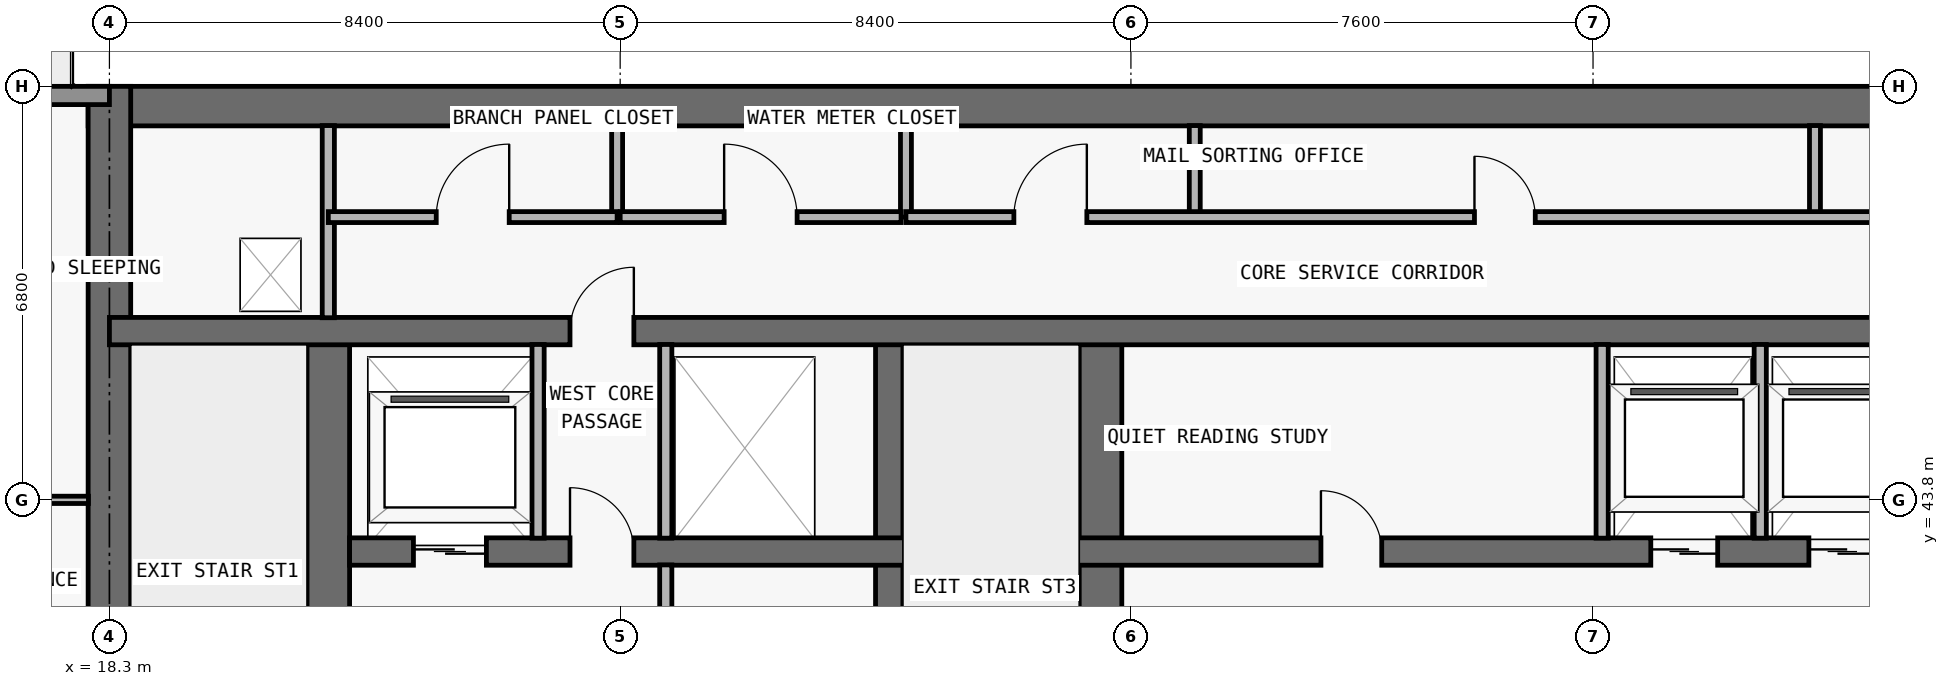
"""IFC4 building model, lengths in metres.
Left out: names, types, materials, properties, quantities, classifications, styles, units other than length and angle.
Written with IfcOpenShell. Run it as: python <this file> out.ifc"""

import sys

from ifc_helpers import new_model, si_unit, direction, frame, frame_2d, origin, place, context, subcontext, project, spatial, rectangle, extrude, element, fill, save


model = new_model("IFC4")
c1 = context("Model", 3, precision=1e-05, world=origin(), true_north=direction((0.0, 1.0)))
c2 = subcontext(c1, "Body", "Model", "MODEL_VIEW")
j1 = project(units=[si_unit("LENGTHUNIT", "METRE"), si_unit("PLANEANGLEUNIT", "RADIAN")], contexts=[c1])
p1 = place(None, origin())
s1 = spatial("IfcSite", under=j1, at=p1, CompositionType="ELEMENT")
p2 = place(p1, origin())
s2 = spatial("IfcBuilding", under=s1, at=p2, CompositionType="ELEMENT")
p3 = place(p2, frame((0.0, 0.0, 170.4)))
s3 = spatial("IfcBuildingStorey", under=s2, at=p3, CompositionType="ELEMENT", Elevation=170.4)
p4 = place(p3, frame((17.95, 50.275, 0.0), z_axis=(0.0, 0.0, 1.0), x_axis=(1.0, 0.0, 0.0)))
e1 = element("IfcWall", 1, at=p4, inside=s3, PredefinedType="SHEAR", context=c2, shape_type="SweptSolid", body=[
    extrude(rectangle(XDim=41.9, YDim=0.65, at=frame_2d((20.95, 0.0))), origin(), (0.0, 0.0, 1.0), 3.05),
])
p5 = place(p3, frame((18.3, 36.65, 0.0), z_axis=(0.0, 0.0, 1.0), x_axis=(0.0, 1.0, 0.0)))
e2 = element("IfcWall", 2, at=p5, inside=s3, PredefinedType="SHEAR", context=c2, shape_type="SweptSolid", body=[
    extrude(rectangle(XDim=13.95, YDim=0.7, at=frame_2d((6.975, 0.0))), origin(), (0.0, 0.0, 1.0), 3.05),
])
p6 = place(p3, frame((21.9, 37.0, 0.0), z_axis=(0.0, 0.0, 1.0), x_axis=(0.0, 1.0, 0.0)))
e3 = element("IfcWall", 3, at=p6, inside=s3, PredefinedType="SHEAR", context=c2, shape_type="SweptSolid", body=[
    extrude(rectangle(XDim=9.575, YDim=0.7, at=frame_2d((4.788, 0.0))), origin(), (0.0, 0.0, 1.0), 3.05),
])
p7 = place(p6, frame((0.55, 0.0, 0.0)))
e4 = element("IfcOpeningElement", 4, at=p7, cuts=e3, PredefinedType="OPENING", context=c2, shape_type="SweptSolid", body=[
    extrude(rectangle(XDim=1.1, YDim=2.15, at=frame_2d((0.55, 1.075))), frame((0.0, 0.36, 0.0), z_axis=(0.0, -1.0, 0.0), x_axis=(1.0, 0.0, 0.0)), (0.0, 0.0, 1.0), 0.72),
])
p8 = place(p3, frame((31.125, 37.0, 0.0), z_axis=(0.0, 0.0, 1.0), x_axis=(0.0, 1.0, 0.0)))
e5 = element("IfcWall", 5, at=p8, inside=s3, PredefinedType="SHEAR", context=c2, shape_type="SweptSolid", body=[
    extrude(rectangle(XDim=9.575, YDim=0.45, at=frame_2d((4.788, 0.0))), origin(), (0.0, 0.0, 1.0), 3.05),
])
p9 = place(p3, frame((34.6, 37.0, 0.0), z_axis=(0.0, 0.0, 1.0), x_axis=(0.0, 1.0, 0.0)))
e6 = element("IfcWall", 6, at=p9, inside=s3, PredefinedType="SHEAR", context=c2, shape_type="SweptSolid", body=[
    extrude(rectangle(XDim=9.575, YDim=0.7, at=frame_2d((4.788, 0.0))), origin(), (0.0, 0.0, 1.0), 3.05),
])
p10 = place(p3, frame((22.25, 42.95, 0.0), z_axis=(0.0, 0.0, 1.0), x_axis=(1.0, 0.0, 0.0)))
e7 = element("IfcWall", 7, at=p10, inside=s3, PredefinedType="SHEAR", context=c2, shape_type="SweptSolid", body=[
    extrude(rectangle(XDim=33.3, YDim=0.45, at=frame_2d((16.65, 0.0))), origin(), (0.0, 0.0, 1.0), 3.05),
])
p11 = place(p10, frame((1.05, 0.0, 0.0)))
e8 = element("IfcOpeningElement", 8, at=p11, cuts=e7, PredefinedType="OPENING", context=c2, shape_type="SweptSolid", body=[
    extrude(rectangle(XDim=1.2, YDim=2.2, at=frame_2d((0.6, 1.1))), frame((0.0, 0.235, 0.0), z_axis=(0.0, -1.0, 0.0), x_axis=(1.0, 0.0, 0.0)), (0.0, 0.0, 1.0), 0.47),
])
p12 = place(p10, frame((31.05, 0.0, 0.0)))
e9 = element("IfcOpeningElement", 9, at=p12, cuts=e7, PredefinedType="OPENING", context=c2, shape_type="SweptSolid", body=[
    extrude(rectangle(XDim=1.2, YDim=2.2, at=frame_2d((0.6, 1.1))), frame((0.0, 0.235, 0.0), z_axis=(0.0, -1.0, 0.0), x_axis=(1.0, 0.0, 0.0)), (0.0, 0.0, 1.0), 0.47),
])
p13 = place(p10, frame((21.4, 0.0, 0.0)))
e10 = element("IfcOpeningElement", 10, at=p13, cuts=e7, PredefinedType="OPENING", context=c2, shape_type="SweptSolid", body=[
    extrude(rectangle(XDim=1.1, YDim=2.2, at=frame_2d((0.55, 1.1))), frame((0.0, 0.235, 0.0), z_axis=(0.0, -1.0, 0.0), x_axis=(1.0, 0.0, 0.0)), (0.0, 0.0, 1.0), 0.47),
])
p14 = place(p10, frame((24.0, 0.0, 0.0)))
e11 = element("IfcOpeningElement", 11, at=p14, cuts=e7, PredefinedType="OPENING", context=c2, shape_type="SweptSolid", body=[
    extrude(rectangle(XDim=1.1, YDim=2.2, at=frame_2d((0.55, 1.1))), frame((0.0, 0.235, 0.0), z_axis=(0.0, -1.0, 0.0), x_axis=(1.0, 0.0, 0.0)), (0.0, 0.0, 1.0), 0.47),
])
p15 = place(p10, frame((3.625, 0.0, 0.0)))
e12 = element("IfcOpeningElement", 12, at=p15, cuts=e7, PredefinedType="OPENING", context=c2, shape_type="SweptSolid", body=[
    extrude(rectangle(XDim=1.05, YDim=2.15, at=frame_2d((0.525, 1.075))), frame((0.0, 0.235, 0.0), z_axis=(0.0, -1.0, 0.0), x_axis=(1.0, 0.0, 0.0)), (0.0, 0.0, 1.0), 0.47),
])
p16 = place(p10, frame((28.675, 0.0, 0.0)))
e13 = element("IfcOpeningElement", 13, at=p16, cuts=e7, PredefinedType="OPENING", context=c2, shape_type="SweptSolid", body=[
    extrude(rectangle(XDim=1.05, YDim=2.15, at=frame_2d((0.525, 1.075))), frame((0.0, 0.235, 0.0), z_axis=(0.0, -1.0, 0.0), x_axis=(1.0, 0.0, 0.0)), (0.0, 0.0, 1.0), 0.47),
])
p17 = place(p10, frame((15.975, 0.0, 0.0)))
e14 = element("IfcOpeningElement", 14, at=p17, cuts=e7, PredefinedType="OPENING", context=c2, shape_type="SweptSolid", body=[
    extrude(rectangle(XDim=1.0, YDim=2.2, at=frame_2d((0.5, 1.1))), frame((0.0, 0.235, 0.0), z_axis=(0.0, -1.0, 0.0), x_axis=(1.0, 0.0, 0.0)), (0.0, 0.0, 1.0), 0.47),
])
p18 = place(p3, frame((18.3, 46.575, 0.0), z_axis=(0.0, 0.0, 1.0), x_axis=(1.0, 0.0, 0.0)))
e15 = element("IfcWall", 15, at=p18, inside=s3, PredefinedType="SHEAR", context=c2, shape_type="SweptSolid", body=[
    extrude(rectangle(XDim=41.2, YDim=0.45, at=frame_2d((20.6, 0.0))), origin(), (0.0, 0.0, 1.0), 3.05),
])
p19 = place(p18, frame((7.575, 0.0, 0.0)))
e16 = element("IfcOpeningElement", 16, at=p19, cuts=e15, PredefinedType="OPENING", context=c2, shape_type="SweptSolid", body=[
    extrude(rectangle(XDim=1.05, YDim=2.15, at=frame_2d((0.525, 1.075))), frame((0.0, 0.235, 0.0), z_axis=(0.0, -1.0, 0.0), x_axis=(1.0, 0.0, 0.0)), (0.0, 0.0, 1.0), 0.47),
])
p20 = place(p18, frame((32.625, 0.0, 0.0)))
e17 = element("IfcOpeningElement", 17, at=p20, cuts=e15, PredefinedType="OPENING", context=c2, shape_type="SweptSolid", body=[
    extrude(rectangle(XDim=1.05, YDim=2.15, at=frame_2d((0.525, 1.075))), frame((0.0, 0.235, 0.0), z_axis=(0.0, -1.0, 0.0), x_axis=(1.0, 0.0, 0.0)), (0.0, 0.0, 1.0), 0.47),
])
p21 = place(p3, frame((10.1, 50.45, 0.0), z_axis=(0.0, 0.0, 1.0), x_axis=(1.0, 0.0, 0.0)))
e18 = element("IfcWall", 18, at=p21, inside=s3, PredefinedType="STANDARD", context=c2, shape_type="SweptSolid", body=[
    extrude(rectangle(XDim=8.2, YDim=0.3, at=frame_2d((4.1, 0.0))), origin(), (0.0, 0.0, 1.0), 3.05),
])
p22 = place(p21, frame((3.1, 0.0, 0.0)))
e19 = element("IfcOpeningElement", 19, at=p22, cuts=e18, PredefinedType="OPENING", context=c2, shape_type="SweptSolid", body=[
    extrude(rectangle(XDim=2.0, YDim=2.3, at=frame_2d((1.0, 1.15))), frame((0.0, 0.16, 0.0), z_axis=(0.0, -1.0, 0.0), x_axis=(1.0, 0.0, 0.0)), (0.0, 0.0, 1.0), 0.32),
])
p23 = place(p3, frame((21.9, 46.795, 0.0), z_axis=(0.0, 0.0, 1.0), x_axis=(0.0, 1.0, 0.0)))
e20 = element("IfcWall", 20, at=p23, inside=s3, PredefinedType="PARTITIONING", context=c2, shape_type="SweptSolid", body=[
    extrude(rectangle(XDim=3.16, YDim=0.2, at=frame_2d((1.58, 0.0))), origin(), (0.0, 0.0, 1.0), 3.05),
])
p24 = place(p3, frame((25.35, 43.17, 0.0), z_axis=(0.0, 0.0, 1.0), x_axis=(0.0, 1.0, 0.0)))
e21 = element("IfcWall", 21, at=p24, inside=s3, PredefinedType="PARTITIONING", context=c2, shape_type="SweptSolid", body=[
    extrude(rectangle(XDim=3.185, YDim=0.2, at=frame_2d((1.593, 0.0))), origin(), (0.0, 0.0, 1.0), 3.05),
])
p25 = place(p3, frame((26.65, 48.45, 0.0), z_axis=(0.0, 0.0, 1.0), x_axis=(0.0, 1.0, 0.0)))
e22 = element("IfcWall", 22, at=p25, inside=s3, PredefinedType="PARTITIONING", context=c2, shape_type="SweptSolid", body=[
    extrude(rectangle(XDim=1.505, YDim=0.18, at=frame_2d((0.752, 0.0))), origin(), (0.0, 0.0, 1.0), 3.05),
])
p26 = place(p3, frame((27.45, 37.345, 0.0), z_axis=(0.0, 0.0, 1.0), x_axis=(0.0, 1.0, 0.0)))
e23 = element("IfcWall", 23, at=p26, inside=s3, PredefinedType="PARTITIONING", context=c2, shape_type="SweptSolid", body=[
    extrude(rectangle(XDim=5.385, YDim=0.2, at=frame_2d((2.692, 0.0))), origin(), (0.0, 0.0, 1.0), 3.05),
])
p27 = place(p3, frame((27.45, 43.17, 0.0), z_axis=(0.0, 0.0, 1.0), x_axis=(0.0, 1.0, 0.0)))
e24 = element("IfcWall", 24, at=p27, inside=s3, PredefinedType="PARTITIONING", context=c2, shape_type="SweptSolid", body=[
    extrude(rectangle(XDim=3.185, YDim=0.2, at=frame_2d((1.593, 0.0))), origin(), (0.0, 0.0, 1.0), 3.05),
])
for number, where, z_axis, x_axis in (
    (25, (31.4, 48.45, 0.0), (0.0, 0.0, 1.0), (0.0, 1.0, 0.0)),
    (26, (36.15, 48.45, 0.0), (0.0, 0.0, 1.0), (0.0, 1.0, 0.0)),
):
    element("IfcWall", number, at=place(p3, frame(where, z_axis=z_axis, x_axis=x_axis)), inside=s3, PredefinedType="PARTITIONING", context=c2, shape_type="SweptSolid", body=[
        extrude(rectangle(XDim=1.505, YDim=0.18, at=frame_2d((0.752, 0.0))), origin(), (0.0, 0.0, 1.0), 3.05),
    ])
for number, where, z_axis, x_axis in (
    (27, (42.85, 43.17, 0.0), (0.0, 0.0, 1.0), (0.0, 1.0, 0.0)),
    (28, (45.45, 43.17, 0.0), (0.0, 0.0, 1.0), (0.0, 1.0, 0.0)),
):
    element("IfcWall", number, at=place(p3, frame(where, z_axis=z_axis, x_axis=x_axis)), inside=s3, PredefinedType="PARTITIONING", context=c2, shape_type="SweptSolid", body=[
        extrude(rectangle(XDim=3.185, YDim=0.2, at=frame_2d((1.593, 0.0))), origin(), (0.0, 0.0, 1.0), 3.05),
    ])
p28 = place(p3, frame((46.35, 48.45, 0.0), z_axis=(0.0, 0.0, 1.0), x_axis=(0.0, 1.0, 0.0)))
e29 = element("IfcWall", 29, at=p28, inside=s3, PredefinedType="PARTITIONING", context=c2, shape_type="SweptSolid", body=[
    extrude(rectangle(XDim=1.505, YDim=0.18, at=frame_2d((0.752, 0.0))), origin(), (0.0, 0.0, 1.0), 3.05),
])
p29 = place(p3, frame((6.395, 43.8, 0.0), z_axis=(0.0, 0.0, 1.0), x_axis=(1.0, 0.0, 0.0)))
e30 = element("IfcWall", 30, at=p29, inside=s3, PredefinedType="PARTITIONING", context=c2, shape_type="SweptSolid", body=[
    extrude(rectangle(XDim=11.56, YDim=0.12, at=frame_2d((5.78, 0.0))), origin(), (0.0, 0.0, 1.0), 2.418),
])
p30 = place(p29, frame((7.215, 0.0, 0.0)))
e31 = element("IfcOpeningElement", 31, at=p30, cuts=e30, PredefinedType="OPENING", context=c2, shape_type="SweptSolid", body=[
    extrude(rectangle(XDim=0.9, YDim=2.15, at=frame_2d((0.45, 1.075))), frame((0.0, 0.07, 0.0), z_axis=(0.0, -1.0, 0.0), x_axis=(1.0, 0.0, 0.0)), (0.0, 0.0, 1.0), 0.14),
])
p31 = place(p29, frame((9.958, 0.0, 0.0)))
e32 = element("IfcOpeningElement", 32, at=p31, cuts=e30, PredefinedType="OPENING", context=c2, shape_type="SweptSolid", body=[
    extrude(rectangle(XDim=0.85, YDim=2.1, at=frame_2d((0.425, 1.05))), frame((0.0, 0.07, 0.0), z_axis=(0.0, -1.0, 0.0), x_axis=(1.0, 0.0, 0.0)), (0.0, 0.0, 1.0), 0.14),
])
p32 = place(p3, frame((21.9, 48.45, 0.0), z_axis=(0.0, 0.0, 1.0), x_axis=(1.0, 0.0, 0.0)))
e33 = element("IfcWall", 33, at=p32, inside=s3, PredefinedType="PARTITIONING", context=c2, shape_type="SweptSolid", body=[
    extrude(rectangle(XDim=4.75, YDim=0.18, at=frame_2d((2.375, 0.0))), origin(), (0.0, 0.0, 1.0), 3.05),
])
p33 = place(p32, frame((1.775, 0.0, 0.0)))
e34 = element("IfcOpeningElement", 34, at=p33, cuts=e33, PredefinedType="OPENING", context=c2, shape_type="SweptSolid", body=[
    extrude(rectangle(XDim=1.2, YDim=2.2, at=frame_2d((0.6, 1.1))), frame((0.0, 0.1, 0.0), z_axis=(0.0, -1.0, 0.0), x_axis=(1.0, 0.0, 0.0)), (0.0, 0.0, 1.0), 0.2),
])
p34 = place(p3, frame((26.7, 48.45, 0.0), z_axis=(0.0, 0.0, 1.0), x_axis=(1.0, 0.0, 0.0)))
e35 = element("IfcWall", 35, at=p34, inside=s3, PredefinedType="PARTITIONING", context=c2, shape_type="SweptSolid", body=[
    extrude(rectangle(XDim=4.62, YDim=0.18, at=frame_2d((2.31, 0.0))), origin(), (0.0, 0.0, 1.0), 3.05),
])
p35 = place(p34, frame((1.71, 0.0, 0.0)))
e36 = element("IfcOpeningElement", 36, at=p35, cuts=e35, PredefinedType="OPENING", context=c2, shape_type="SweptSolid", body=[
    extrude(rectangle(XDim=1.2, YDim=2.2, at=frame_2d((0.6, 1.1))), frame((0.0, 0.1, 0.0), z_axis=(0.0, -1.0, 0.0), x_axis=(1.0, 0.0, 0.0)), (0.0, 0.0, 1.0), 0.2),
])
p36 = place(p3, frame((31.4, 48.45, 0.0), z_axis=(0.0, 0.0, 1.0), x_axis=(1.0, 0.0, 0.0)))
e37 = element("IfcWall", 37, at=p36, inside=s3, PredefinedType="PARTITIONING", context=c2, shape_type="SweptSolid", body=[
    extrude(rectangle(XDim=24.5, YDim=0.18, at=frame_2d((12.25, 0.0))), origin(), (0.0, 0.0, 1.0), 3.05),
])
p37 = place(p36, frame((1.775, 0.0, 0.0)))
e38 = element("IfcOpeningElement", 38, at=p37, cuts=e37, PredefinedType="OPENING", context=c2, shape_type="SweptSolid", body=[
    extrude(rectangle(XDim=1.2, YDim=2.2, at=frame_2d((0.6, 1.1))), frame((0.0, 0.1, 0.0), z_axis=(0.0, -1.0, 0.0), x_axis=(1.0, 0.0, 0.0)), (0.0, 0.0, 1.0), 0.2),
])
p38 = place(p36, frame((9.35, 0.0, 0.0)))
e39 = element("IfcOpeningElement", 39, at=p38, cuts=e37, PredefinedType="OPENING", context=c2, shape_type="SweptSolid", body=[
    extrude(rectangle(XDim=1.0, YDim=2.2, at=frame_2d((0.5, 1.1))), frame((0.0, 0.1, 0.0), z_axis=(0.0, -1.0, 0.0), x_axis=(1.0, 0.0, 0.0)), (0.0, 0.0, 1.0), 0.2),
])
p39 = place(p36, frame((16.725, 0.0, 0.0)))
e40 = element("IfcOpeningElement", 40, at=p39, cuts=e37, PredefinedType="OPENING", context=c2, shape_type="SweptSolid", body=[
    extrude(rectangle(XDim=1.2, YDim=2.2, at=frame_2d((0.6, 1.1))), frame((0.0, 0.1, 0.0), z_axis=(0.0, -1.0, 0.0), x_axis=(1.0, 0.0, 0.0)), (0.0, 0.0, 1.0), 0.2),
])
p40 = place(p36, frame((21.675, 0.0, 0.0)))
e41 = element("IfcOpeningElement", 41, at=p40, cuts=e37, PredefinedType="OPENING", context=c2, shape_type="SweptSolid", body=[
    extrude(rectangle(XDim=0.85, YDim=2.1, at=frame_2d((0.425, 1.05))), frame((0.0, 0.1, 0.0), z_axis=(0.0, -1.0, 0.0), x_axis=(1.0, 0.0, 0.0)), (0.0, 0.0, 1.0), 0.2),
])
p41 = place(p11, origin())
e42 = element("IfcDoor", 42, at=p41, inside=s3, OperationType="DOUBLE_DOOR_SLIDING", PredefinedType="DOOR", context=c2, shape_type="SweptSolid", body=[
    extrude(rectangle(XDim=1.2, YDim=2.2, at=frame_2d((0.6, 1.1))), frame((0.0, 0.025, 0.0), z_axis=(0.0, -1.0, 0.0), x_axis=(1.0, 0.0, 0.0)), (0.0, 0.0, 1.0), 0.05),
])
fill(e8, e42)
p42 = place(p13, origin())
e43 = element("IfcDoor", 43, at=p42, inside=s3, OperationType="DOUBLE_DOOR_SLIDING", PredefinedType="DOOR", context=c2, shape_type="SweptSolid", body=[
    extrude(rectangle(XDim=1.1, YDim=2.2, at=frame_2d((0.55, 1.1))), frame((0.0, 0.025, 0.0), z_axis=(0.0, -1.0, 0.0), x_axis=(1.0, 0.0, 0.0)), (0.0, 0.0, 1.0), 0.05),
])
fill(e10, e43)
p43 = place(p14, origin())
e44 = element("IfcDoor", 44, at=p43, inside=s3, OperationType="DOUBLE_DOOR_SLIDING", PredefinedType="DOOR", context=c2, shape_type="SweptSolid", body=[
    extrude(rectangle(XDim=1.1, YDim=2.2, at=frame_2d((0.55, 1.1))), frame((0.0, 0.025, 0.0), z_axis=(0.0, -1.0, 0.0), x_axis=(1.0, 0.0, 0.0)), (0.0, 0.0, 1.0), 0.05),
])
fill(e11, e44)
p44 = place(p15, origin())
e45 = element("IfcDoor", 45, at=p44, inside=s3, OperationType="SINGLE_SWING_LEFT", PredefinedType="DOOR", context=c2, shape_type="SweptSolid", body=[
    extrude(rectangle(XDim=1.05, YDim=2.15, at=frame_2d((0.525, 1.075))), frame((0.0, 0.025, 0.0), z_axis=(0.0, -1.0, 0.0), x_axis=(1.0, 0.0, 0.0)), (0.0, 0.0, 1.0), 0.05),
])
fill(e12, e45)
p45 = place(p17, origin())
e46 = element("IfcDoor", 46, at=p45, inside=s3, OperationType="SINGLE_SWING_LEFT", PredefinedType="DOOR", context=c2, shape_type="SweptSolid", body=[
    extrude(rectangle(XDim=1.0, YDim=2.2, at=frame_2d((0.5, 1.1))), frame((0.0, 0.025, 0.0), z_axis=(0.0, -1.0, 0.0), x_axis=(1.0, 0.0, 0.0)), (0.0, 0.0, 1.0), 0.05),
])
fill(e14, e46)
p46 = place(p19, origin())
e47 = element("IfcDoor", 47, at=p46, inside=s3, OperationType="SINGLE_SWING_RIGHT", PredefinedType="DOOR", context=c2, shape_type="SweptSolid", body=[
    extrude(rectangle(XDim=1.05, YDim=2.15, at=frame_2d((0.525, 1.075))), frame((0.0, 0.025, 0.0), z_axis=(0.0, -1.0, 0.0), x_axis=(1.0, 0.0, 0.0)), (0.0, 0.0, 1.0), 0.05),
])
fill(e16, e47)
p47 = place(p33, origin())
e48 = element("IfcDoor", 48, at=p47, inside=s3, OperationType="SINGLE_SWING_RIGHT", PredefinedType="DOOR", context=c2, shape_type="SweptSolid", body=[
    extrude(rectangle(XDim=1.2, YDim=2.2, at=frame_2d((0.6, 1.1))), frame((0.0, 0.025, 0.0), z_axis=(0.0, -1.0, 0.0), x_axis=(1.0, 0.0, 0.0)), (0.0, 0.0, 1.0), 0.05),
])
fill(e34, e48)
p48 = place(p35, origin())
e49 = element("IfcDoor", 49, at=p48, inside=s3, OperationType="SINGLE_SWING_LEFT", PredefinedType="DOOR", context=c2, shape_type="SweptSolid", body=[
    extrude(rectangle(XDim=1.2, YDim=2.2, at=frame_2d((0.6, 1.1))), frame((0.0, 0.025, 0.0), z_axis=(0.0, -1.0, 0.0), x_axis=(1.0, 0.0, 0.0)), (0.0, 0.0, 1.0), 0.05),
])
fill(e36, e49)
p49 = place(p37, origin())
e50 = element("IfcDoor", 50, at=p49, inside=s3, OperationType="SINGLE_SWING_RIGHT", PredefinedType="DOOR", context=c2, shape_type="SweptSolid", body=[
    extrude(rectangle(XDim=1.2, YDim=2.2, at=frame_2d((0.6, 1.1))), frame((0.0, 0.025, 0.0), z_axis=(0.0, -1.0, 0.0), x_axis=(1.0, 0.0, 0.0)), (0.0, 0.0, 1.0), 0.05),
])
fill(e38, e50)
p50 = place(p38, origin())
e51 = element("IfcDoor", 51, at=p50, inside=s3, OperationType="SINGLE_SWING_LEFT", PredefinedType="DOOR", context=c2, shape_type="SweptSolid", body=[
    extrude(rectangle(XDim=1.0, YDim=2.2, at=frame_2d((0.5, 1.1))), frame((0.0, 0.025, 0.0), z_axis=(0.0, -1.0, 0.0), x_axis=(1.0, 0.0, 0.0)), (0.0, 0.0, 1.0), 0.05),
])
fill(e39, e51)
save(model, sys.argv[1])
